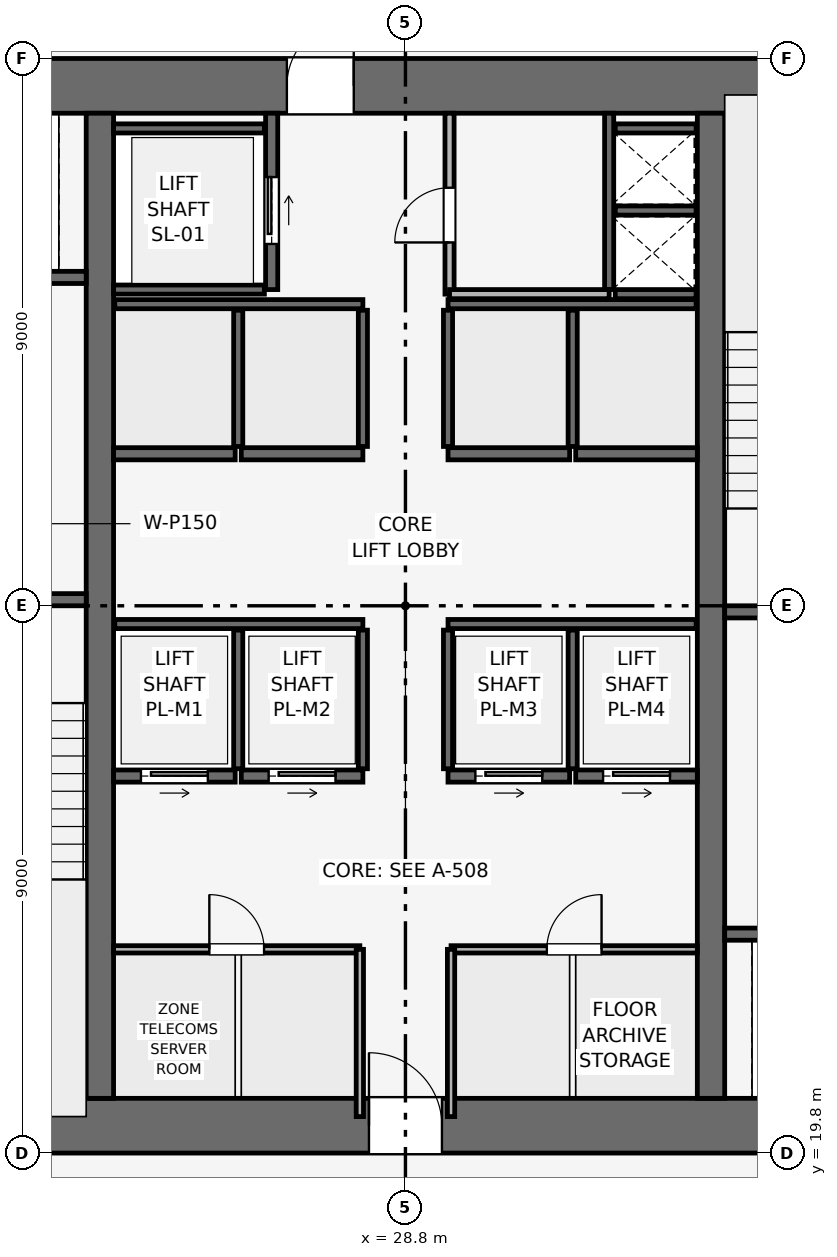
"""IFC4 building model, lengths in metres.
Left out: names, types, materials, properties, quantities, classifications, styles, units other than length and angle.
Written with IfcOpenShell. Run it as: python <this file> out.ifc"""

import sys

from ifc_helpers import new_model, si_unit, direction, frame, frame_2d, origin, place, context, subcontext, project, spatial, rectangle, extrude, element, fill, save


model = new_model("IFC4")
c1 = context("Model", 3, precision=1e-05, world=origin(), true_north=direction((0.0, 1.0)))
c2 = subcontext(c1, "Body", "Model", "MODEL_VIEW")
j1 = project(units=[si_unit("LENGTHUNIT", "METRE"), si_unit("PLANEANGLEUNIT", "RADIAN")], contexts=[c1])
p1 = place(None, origin())
s1 = spatial("IfcSite", under=j1, at=p1, CompositionType="ELEMENT")
p2 = place(p1, origin())
s2 = spatial("IfcBuilding", under=s1, at=p2, CompositionType="ELEMENT")
p3 = place(p2, frame((0.0, 0.0, 168.3)))
s3 = spatial("IfcBuildingStorey", under=s2, at=p3, CompositionType="ELEMENT", Elevation=168.3)
p4 = place(p3, frame((19.8, 20.25, 0.0), z_axis=(0.0, 0.0, 1.0), x_axis=(1.0, 0.0, 0.0)))
e1 = element("IfcWall", 1, at=p4, inside=s3, PredefinedType="SHEAR", context=c2, shape_type="SweptSolid", body=[
    extrude(rectangle(XDim=18.0, YDim=0.9, at=frame_2d((9.0, 0.0))), origin(), (0.0, 0.0, 1.0), 3.75),
])
p5 = place(p4, frame((8.4, 0.0, 0.0)))
e2 = element("IfcOpeningElement", 2, at=p5, cuts=e1, PredefinedType="OPENING", context=c2, shape_type="SweptSolid", body=[
    extrude(rectangle(XDim=1.2, YDim=2.2, at=frame_2d((0.6, 1.1))), frame((0.0, 0.46, 0.0), z_axis=(0.0, -1.0, 0.0), x_axis=(1.0, 0.0, 0.0)), (0.0, 0.0, 1.0), 0.92),
])
p6 = place(p3, frame((19.8, 37.35, 0.0), z_axis=(0.0, 0.0, 1.0), x_axis=(1.0, 0.0, 0.0)))
e3 = element("IfcWall", 3, at=p6, inside=s3, PredefinedType="SHEAR", context=c2, shape_type="SweptSolid", body=[
    extrude(rectangle(XDim=18.0, YDim=0.9, at=frame_2d((9.0, 0.0))), origin(), (0.0, 0.0, 1.0), 3.75),
])
p7 = place(p6, frame((7.05, 0.0, 0.0)))
e4 = element("IfcOpeningElement", 4, at=p7, cuts=e3, PredefinedType="OPENING", context=c2, shape_type="SweptSolid", body=[
    extrude(rectangle(XDim=1.1, YDim=2.15, at=frame_2d((0.55, 1.075))), frame((0.0, 0.46, 0.0), z_axis=(0.0, -1.0, 0.0), x_axis=(1.0, 0.0, 0.0)), (0.0, 0.0, 1.0), 0.92),
])
for number, where, z_axis, x_axis in (
    (5, (23.775, 20.7, 0.0), (0.0, 0.0, 1.0), (0.0, 1.0, 0.0)),
    (6, (33.825, 20.7, 0.0), (0.0, 0.0, 1.0), (0.0, 1.0, 0.0)),
):
    element("IfcWall", number, at=place(p3, frame(where, z_axis=z_axis, x_axis=x_axis)), inside=s3, PredefinedType="SHEAR", context=c2, shape_type="SweptSolid", body=[
        extrude(rectangle(XDim=16.2, YDim=0.45, at=frame_2d((8.1, 0.0))), origin(), (0.0, 0.0, 1.0), 3.75),
    ])
p8 = place(p3, frame((20.4, 28.9, 0.0), z_axis=(0.0, 0.0, 1.0), x_axis=(1.0, 0.0, 0.0)))
e7 = element("IfcWall", 7, at=p8, inside=s3, PredefinedType="SHEAR", context=c2, shape_type="SweptSolid", body=[
    extrude(rectangle(XDim=3.15, YDim=0.2, at=frame_2d((1.575, 0.0))), origin(), (0.0, 0.0, 1.0), 3.495),
])
p9 = place(p8, frame((0.8, 0.0, 0.0)))
e8 = element("IfcOpeningElement", 8, at=p9, cuts=e7, PredefinedType="OPENING", context=c2, shape_type="SweptSolid", body=[
    extrude(rectangle(XDim=1.0, YDim=2.1, at=frame_2d((0.5, 1.05))), frame((0.0, 0.11, 0.0), z_axis=(0.0, -1.0, 0.0), x_axis=(1.0, 0.0, 0.0)), (0.0, 0.0, 1.0), 0.22),
])
p10 = place(p3, frame((34.05, 28.7, 0.0), z_axis=(0.0, 0.0, 1.0), x_axis=(1.0, 0.0, 0.0)))
e9 = element("IfcWall", 9, at=p10, inside=s3, PredefinedType="SHEAR", context=c2, shape_type="SweptSolid", body=[
    extrude(rectangle(XDim=3.15, YDim=0.2, at=frame_2d((1.575, 0.0))), origin(), (0.0, 0.0, 1.0), 3.495),
])
p11 = place(p10, frame((0.8, 0.0, 0.0)))
e10 = element("IfcOpeningElement", 10, at=p11, cuts=e9, PredefinedType="OPENING", context=c2, shape_type="SweptSolid", body=[
    extrude(rectangle(XDim=1.0, YDim=2.1, at=frame_2d((0.5, 1.05))), frame((0.0, 0.11, 0.0), z_axis=(0.0, -1.0, 0.0), x_axis=(1.0, 0.0, 0.0)), (0.0, 0.0, 1.0), 0.22),
])
p12 = place(p3, frame((32.15, 34.0, 0.0), z_axis=(0.0, 0.0, 1.0), x_axis=(0.0, 1.0, 0.0)))
e11 = element("IfcWall", 11, at=p12, inside=s3, PredefinedType="SHEAR", context=c2, shape_type="SweptSolid", body=[
    extrude(rectangle(XDim=2.9, YDim=0.15, at=frame_2d((1.45, 0.0))), origin(), (0.0, 0.0, 1.0), 3.495),
])
for number, where, z_axis, x_axis in (
    (12, (32.25, 33.925, 0.0), (0.0, 0.0, 1.0), (1.0, 0.0, 0.0)),
    (13, (32.25, 35.3, 0.0), (0.0, 0.0, 1.0), (1.0, 0.0, 0.0)),
):
    element("IfcWall", number, at=place(p3, frame(where, z_axis=z_axis, x_axis=x_axis)), inside=s3, PredefinedType="SHEAR", context=c2, shape_type="SweptSolid", body=[
        extrude(rectangle(XDim=1.33, YDim=0.15, at=frame_2d((0.665, 0.0))), origin(), (0.0, 0.0, 1.0), 3.495),
    ])
p13 = place(p3, frame((20.5, 34.2, 0.0), z_axis=(0.0, 0.0, 1.0), x_axis=(1.0, 0.0, 0.0)))
e14 = element("IfcWall", 14, at=p13, inside=s3, PredefinedType="SHEAR", context=c2, shape_type="SweptSolid", body=[
    extrude(rectangle(XDim=3.05, YDim=0.2, at=frame_2d((1.525, 0.0))), origin(), (0.0, 0.0, 1.0), 3.495),
])
p14 = place(p13, frame((0.75, 0.0, 0.0)))
e15 = element("IfcOpeningElement", 15, at=p14, cuts=e14, PredefinedType="OPENING", context=c2, shape_type="SweptSolid", body=[
    extrude(rectangle(XDim=1.1, YDim=2.15, at=frame_2d((0.55, 1.075))), frame((0.0, 0.11, 0.0), z_axis=(0.0, -1.0, 0.0), x_axis=(1.0, 0.0, 0.0)), (0.0, 0.0, 1.0), 0.22),
])
p15 = place(p3, frame((34.05, 23.4, 0.0), z_axis=(0.0, 0.0, 1.0), x_axis=(1.0, 0.0, 0.0)))
e16 = element("IfcWall", 16, at=p15, inside=s3, PredefinedType="SHEAR", context=c2, shape_type="SweptSolid", body=[
    extrude(rectangle(XDim=3.05, YDim=0.2, at=frame_2d((1.525, 0.0))), origin(), (0.0, 0.0, 1.0), 3.495),
])
p16 = place(p15, frame((1.2, 0.0, 0.0)))
e17 = element("IfcOpeningElement", 17, at=p16, cuts=e16, PredefinedType="OPENING", context=c2, shape_type="SweptSolid", body=[
    extrude(rectangle(XDim=1.1, YDim=2.15, at=frame_2d((0.55, 1.075))), frame((0.0, 0.11, 0.0), z_axis=(0.0, -1.0, 0.0), x_axis=(1.0, 0.0, 0.0)), (0.0, 0.0, 1.0), 0.22),
])
p17 = place(p3, frame((26.6, 34.0, 0.0), z_axis=(0.0, 0.0, 1.0), x_axis=(0.0, 1.0, 0.0)))
e18 = element("IfcWall", 18, at=p17, inside=s3, PredefinedType="SHEAR", context=c2, shape_type="SweptSolid", body=[
    extrude(rectangle(XDim=2.9, YDim=0.2, at=frame_2d((1.45, 0.0))), origin(), (0.0, 0.0, 1.0), 3.495),
])
p18 = place(p17, frame((0.75, 0.0, 0.0)))
e19 = element("IfcOpeningElement", 19, at=p18, cuts=e18, PredefinedType="OPENING", context=c2, shape_type="SweptSolid", body=[
    extrude(rectangle(XDim=1.1, YDim=2.15, at=frame_2d((0.55, 1.075))), frame((0.0, 0.11, 0.0), z_axis=(0.0, -1.0, 0.0), x_axis=(1.0, 0.0, 0.0)), (0.0, 0.0, 1.0), 0.22),
])
for number, where, z_axis, x_axis in (
    (20, (24.0, 34.0, 0.0), (0.0, 0.0, 1.0), (1.0, 0.0, 0.0)),
    (21, (24.0, 36.65, 0.0), (0.0, 0.0, 1.0), (1.0, 0.0, 0.0)),
):
    element("IfcWall", number, at=place(p3, frame(where, z_axis=z_axis, x_axis=x_axis)), inside=s3, PredefinedType="SHEAR", context=c2, shape_type="SweptSolid", body=[
        extrude(rectangle(XDim=2.48, YDim=0.15, at=frame_2d((1.24, 0.0))), origin(), (0.0, 0.0, 1.0), 3.495),
    ])
p19 = place(p3, frame((24.0, 26.0, 0.0), z_axis=(0.0, 0.0, 1.0), x_axis=(1.0, 0.0, 0.0)))
e22 = element("IfcWall", 22, at=p19, inside=s3, PredefinedType="SHEAR", context=c2, shape_type="SweptSolid", body=[
    extrude(rectangle(XDim=2.0, YDim=0.2, at=frame_2d((1.0, 0.0))), origin(), (0.0, 0.0, 1.0), 3.495),
])
p20 = place(p19, frame((0.45, 0.0, 0.0)))
e23 = element("IfcOpeningElement", 23, at=p20, cuts=e22, PredefinedType="OPENING", context=c2, shape_type="SweptSolid", body=[
    extrude(rectangle(XDim=1.1, YDim=2.15, at=frame_2d((0.55, 1.075))), frame((0.0, 0.11, 0.0), z_axis=(0.0, -1.0, 0.0), x_axis=(1.0, 0.0, 0.0)), (0.0, 0.0, 1.0), 0.22),
])
p21 = place(p3, frame((26.1, 26.0, 0.0), z_axis=(0.0, 0.0, 1.0), x_axis=(1.0, 0.0, 0.0)))
e24 = element("IfcWall", 24, at=p21, inside=s3, PredefinedType="SHEAR", context=c2, shape_type="SweptSolid", body=[
    extrude(rectangle(XDim=2.0, YDim=0.2, at=frame_2d((1.0, 0.0))), origin(), (0.0, 0.0, 1.0), 3.495),
])
p22 = place(p21, frame((0.45, 0.0, 0.0)))
e25 = element("IfcOpeningElement", 25, at=p22, cuts=e24, PredefinedType="OPENING", context=c2, shape_type="SweptSolid", body=[
    extrude(rectangle(XDim=1.1, YDim=2.15, at=frame_2d((0.55, 1.075))), frame((0.0, 0.11, 0.0), z_axis=(0.0, -1.0, 0.0), x_axis=(1.0, 0.0, 0.0)), (0.0, 0.0, 1.0), 0.22),
])
p23 = place(p3, frame((29.5, 26.0, 0.0), z_axis=(0.0, 0.0, 1.0), x_axis=(1.0, 0.0, 0.0)))
e26 = element("IfcWall", 26, at=p23, inside=s3, PredefinedType="SHEAR", context=c2, shape_type="SweptSolid", body=[
    extrude(rectangle(XDim=2.0, YDim=0.2, at=frame_2d((1.0, 0.0))), origin(), (0.0, 0.0, 1.0), 3.495),
])
p24 = place(p23, frame((0.45, 0.0, 0.0)))
e27 = element("IfcOpeningElement", 27, at=p24, cuts=e26, PredefinedType="OPENING", context=c2, shape_type="SweptSolid", body=[
    extrude(rectangle(XDim=1.1, YDim=2.15, at=frame_2d((0.55, 1.075))), frame((0.0, 0.11, 0.0), z_axis=(0.0, -1.0, 0.0), x_axis=(1.0, 0.0, 0.0)), (0.0, 0.0, 1.0), 0.22),
])
p25 = place(p3, frame((31.6, 26.0, 0.0), z_axis=(0.0, 0.0, 1.0), x_axis=(1.0, 0.0, 0.0)))
e28 = element("IfcWall", 28, at=p25, inside=s3, PredefinedType="SHEAR", context=c2, shape_type="SweptSolid", body=[
    extrude(rectangle(XDim=2.0, YDim=0.2, at=frame_2d((1.0, 0.0))), origin(), (0.0, 0.0, 1.0), 3.495),
])
p26 = place(p25, frame((0.45, 0.0, 0.0)))
e29 = element("IfcOpeningElement", 29, at=p26, cuts=e28, PredefinedType="OPENING", context=c2, shape_type="SweptSolid", body=[
    extrude(rectangle(XDim=1.1, YDim=2.15, at=frame_2d((0.55, 1.075))), frame((0.0, 0.11, 0.0), z_axis=(0.0, -1.0, 0.0), x_axis=(1.0, 0.0, 0.0)), (0.0, 0.0, 1.0), 0.22),
])
for number, where, z_axis, x_axis in (
    (30, (24.0, 31.3, 0.0), (0.0, 0.0, 1.0), (1.0, 0.0, 0.0)),
    (31, (26.1, 31.3, 0.0), (0.0, 0.0, 1.0), (1.0, 0.0, 0.0)),
    (32, (29.5, 31.3, 0.0), (0.0, 0.0, 1.0), (1.0, 0.0, 0.0)),
    (33, (31.6, 31.3, 0.0), (0.0, 0.0, 1.0), (1.0, 0.0, 0.0)),
):
    element("IfcWall", number, at=place(p3, frame(where, z_axis=z_axis, x_axis=x_axis)), inside=s3, PredefinedType="SHEAR", context=c2, shape_type="SweptSolid", body=[
        extrude(rectangle(XDim=2.0, YDim=0.2, at=frame_2d((1.0, 0.0))), origin(), (0.0, 0.0, 1.0), 3.495),
    ])
p27 = place(p3, frame((32.25, 36.65, 0.0), z_axis=(0.0, 0.0, 1.0), x_axis=(1.0, 0.0, 0.0)))
e34 = element("IfcWall", 34, at=p27, inside=s3, PredefinedType="SHEAR", context=c2, shape_type="SweptSolid", body=[
    extrude(rectangle(XDim=1.33, YDim=0.15, at=frame_2d((0.665, 0.0))), origin(), (0.0, 0.0, 1.0), 3.495),
])
for number, where, z_axis, x_axis in (
    (35, (24.02, 28.5, 0.0), (0.0, 0.0, 1.0), (1.0, 0.0, 0.0)),
    (36, (29.5, 28.5, 0.0), (0.0, 0.0, 1.0), (1.0, 0.0, 0.0)),
):
    element("IfcWall", number, at=place(p3, frame(where, z_axis=z_axis, x_axis=x_axis)), inside=s3, PredefinedType="SHEAR", context=c2, shape_type="SweptSolid", body=[
        extrude(rectangle(XDim=4.08, YDim=0.15, at=frame_2d((2.04, 0.0))), origin(), (0.0, 0.0, 1.0), 3.495),
    ])
for number, where, z_axis, x_axis in (
    (37, (26.05, 26.12, 0.0), (0.0, 0.0, 1.0), (0.0, 1.0, 0.0)),
    (38, (28.1, 26.12, 0.0), (0.0, 0.0, 1.0), (0.0, 1.0, 0.0)),
    (39, (29.5, 26.12, 0.0), (0.0, 0.0, 1.0), (0.0, 1.0, 0.0)),
    (40, (31.55, 26.12, 0.0), (0.0, 0.0, 1.0), (0.0, 1.0, 0.0)),
):
    element("IfcWall", number, at=place(p3, frame(where, z_axis=z_axis, x_axis=x_axis)), inside=s3, PredefinedType="SHEAR", context=c2, shape_type="SweptSolid", body=[
        extrude(rectangle(XDim=2.28, YDim=0.15, at=frame_2d((1.14, 0.0))), origin(), (0.0, 0.0, 1.0), 3.495),
    ])
for number, where, z_axis, x_axis in (
    (41, (24.02, 33.76, 0.0), (0.0, 0.0, 1.0), (1.0, 0.0, 0.0)),
    (42, (29.5, 33.76, 0.0), (0.0, 0.0, 1.0), (1.0, 0.0, 0.0)),
):
    element("IfcWall", number, at=place(p3, frame(where, z_axis=z_axis, x_axis=x_axis)), inside=s3, PredefinedType="SHEAR", context=c2, shape_type="SweptSolid", body=[
        extrude(rectangle(XDim=4.08, YDim=0.15, at=frame_2d((2.04, 0.0))), origin(), (0.0, 0.0, 1.0), 3.495),
    ])
for number, where, z_axis, x_axis in (
    (43, (26.05, 31.42, 0.0), (0.0, 0.0, 1.0), (0.0, 1.0, 0.0)),
    (44, (28.1, 31.42, 0.0), (0.0, 0.0, 1.0), (0.0, 1.0, 0.0)),
    (45, (29.5, 31.42, 0.0), (0.0, 0.0, 1.0), (0.0, 1.0, 0.0)),
    (46, (31.55, 31.42, 0.0), (0.0, 0.0, 1.0), (0.0, 1.0, 0.0)),
):
    element("IfcWall", number, at=place(p3, frame(where, z_axis=z_axis, x_axis=x_axis)), inside=s3, PredefinedType="SHEAR", context=c2, shape_type="SweptSolid", body=[
        extrude(rectangle(XDim=2.24, YDim=0.15, at=frame_2d((1.12, 0.0))), origin(), (0.0, 0.0, 1.0), 3.495),
    ])
p28 = place(p3, frame((29.525, 33.925, 0.0), z_axis=(0.0, 0.0, 1.0), x_axis=(0.0, 1.0, 0.0)))
e47 = element("IfcWall", 47, at=p28, inside=s3, PredefinedType="PARTITIONING", context=c2, shape_type="SweptSolid", body=[
    extrude(rectangle(XDim=2.975, YDim=0.15, at=frame_2d((1.487, 0.0))), origin(), (0.0, 0.0, 1.0), 3.495),
])
p29 = place(p28, frame((0.85, 0.0, 0.0)))
e48 = element("IfcOpeningElement", 48, at=p29, cuts=e47, PredefinedType="OPENING", context=c2, shape_type="SweptSolid", body=[
    extrude(rectangle(XDim=0.9, YDim=2.1, at=frame_2d((0.45, 1.05))), frame((0.0, 0.085, 0.0), z_axis=(0.0, -1.0, 0.0), x_axis=(1.0, 0.0, 0.0)), (0.0, 0.0, 1.0), 0.17),
])
p30 = place(p3, frame((29.525, 33.925, 0.0), z_axis=(0.0, 0.0, 1.0), x_axis=(1.0, 0.0, 0.0)))
e49 = element("IfcWall", 49, at=p30, inside=s3, PredefinedType="PARTITIONING", context=c2, shape_type="SweptSolid", body=[
    extrude(rectangle(XDim=2.625, YDim=0.15, at=frame_2d((1.312, 0.0))), origin(), (0.0, 0.0, 1.0), 3.495),
])
p31 = place(p3, frame((24.0, 23.15, 0.0), z_axis=(0.0, 0.0, 1.0), x_axis=(1.0, 0.0, 0.0)))
e50 = element("IfcWall", 50, at=p31, inside=s3, PredefinedType="PARTITIONING", context=c2, shape_type="SweptSolid", body=[
    extrude(rectangle(XDim=4.05, YDim=0.12, at=frame_2d((2.025, 0.0))), origin(), (0.0, 0.0, 1.0), 3.495),
])
p32 = place(p31, frame((1.575, 0.0, 0.0)))
e51 = element("IfcOpeningElement", 51, at=p32, cuts=e50, PredefinedType="OPENING", context=c2, shape_type="SweptSolid", body=[
    extrude(rectangle(XDim=0.9, YDim=2.1, at=frame_2d((0.45, 1.05))), frame((0.0, 0.07, 0.0), z_axis=(0.0, -1.0, 0.0), x_axis=(1.0, 0.0, 0.0)), (0.0, 0.0, 1.0), 0.14),
])
p33 = place(p3, frame((28.05, 20.4, 0.0), z_axis=(0.0, 0.0, 1.0), x_axis=(0.0, 1.0, 0.0)))
e52 = element("IfcWall", 52, at=p33, inside=s3, PredefinedType="PARTITIONING", context=c2, shape_type="SweptSolid", body=[
    extrude(rectangle(XDim=2.75, YDim=0.12, at=frame_2d((1.375, 0.0))), origin(), (0.0, 0.0, 1.0), 3.495),
])
p34 = place(p3, frame((29.55, 23.15, 0.0), z_axis=(0.0, 0.0, 1.0), x_axis=(1.0, 0.0, 0.0)))
e53 = element("IfcWall", 53, at=p34, inside=s3, PredefinedType="PARTITIONING", context=c2, shape_type="SweptSolid", body=[
    extrude(rectangle(XDim=4.05, YDim=0.12, at=frame_2d((2.025, 0.0))), origin(), (0.0, 0.0, 1.0), 3.495),
])
p35 = place(p34, frame((1.575, 0.0, 0.0)))
e54 = element("IfcOpeningElement", 54, at=p35, cuts=e53, PredefinedType="OPENING", context=c2, shape_type="SweptSolid", body=[
    extrude(rectangle(XDim=0.9, YDim=2.1, at=frame_2d((0.45, 1.05))), frame((0.0, 0.07, 0.0), z_axis=(0.0, -1.0, 0.0), x_axis=(1.0, 0.0, 0.0)), (0.0, 0.0, 1.0), 0.14),
])
p36 = place(p3, frame((29.55, 20.4, 0.0), z_axis=(0.0, 0.0, 1.0), x_axis=(0.0, 1.0, 0.0)))
e55 = element("IfcWall", 55, at=p36, inside=s3, PredefinedType="PARTITIONING", context=c2, shape_type="SweptSolid", body=[
    extrude(rectangle(XDim=2.75, YDim=0.12, at=frame_2d((1.375, 0.0))), origin(), (0.0, 0.0, 1.0), 3.495),
])
p37 = place(p18, origin())
e56 = element("IfcDoor", 56, at=p37, inside=s3, OperationType="SLIDING_TO_RIGHT", PredefinedType="DOOR", context=c2, shape_type="SweptSolid", body=[
    extrude(rectangle(XDim=1.1, YDim=2.15, at=frame_2d((0.55, 1.075))), frame((0.0, 0.025, 0.0), z_axis=(0.0, -1.0, 0.0), x_axis=(1.0, 0.0, 0.0)), (0.0, 0.0, 1.0), 0.05),
])
fill(e19, e56)
p38 = place(p20, origin())
e57 = element("IfcDoor", 57, at=p38, inside=s3, OperationType="SLIDING_TO_RIGHT", PredefinedType="DOOR", context=c2, shape_type="SweptSolid", body=[
    extrude(rectangle(XDim=1.1, YDim=2.15, at=frame_2d((0.55, 1.075))), frame((0.0, 0.025, 0.0), z_axis=(0.0, -1.0, 0.0), x_axis=(1.0, 0.0, 0.0)), (0.0, 0.0, 1.0), 0.05),
])
fill(e23, e57)
p39 = place(p22, origin())
e58 = element("IfcDoor", 58, at=p39, inside=s3, OperationType="SLIDING_TO_RIGHT", PredefinedType="DOOR", context=c2, shape_type="SweptSolid", body=[
    extrude(rectangle(XDim=1.1, YDim=2.15, at=frame_2d((0.55, 1.075))), frame((0.0, 0.025, 0.0), z_axis=(0.0, -1.0, 0.0), x_axis=(1.0, 0.0, 0.0)), (0.0, 0.0, 1.0), 0.05),
])
fill(e25, e58)
p40 = place(p24, origin())
e59 = element("IfcDoor", 59, at=p40, inside=s3, OperationType="SLIDING_TO_RIGHT", PredefinedType="DOOR", context=c2, shape_type="SweptSolid", body=[
    extrude(rectangle(XDim=1.1, YDim=2.15, at=frame_2d((0.55, 1.075))), frame((0.0, 0.025, 0.0), z_axis=(0.0, -1.0, 0.0), x_axis=(1.0, 0.0, 0.0)), (0.0, 0.0, 1.0), 0.05),
])
fill(e27, e59)
p41 = place(p26, origin())
e60 = element("IfcDoor", 60, at=p41, inside=s3, OperationType="SLIDING_TO_RIGHT", PredefinedType="DOOR", context=c2, shape_type="SweptSolid", body=[
    extrude(rectangle(XDim=1.1, YDim=2.15, at=frame_2d((0.55, 1.075))), frame((0.0, 0.025, 0.0), z_axis=(0.0, -1.0, 0.0), x_axis=(1.0, 0.0, 0.0)), (0.0, 0.0, 1.0), 0.05),
])
fill(e29, e60)
p42 = place(p29, origin())
e61 = element("IfcDoor", 61, at=p42, inside=s3, OperationType="SINGLE_SWING_LEFT", PredefinedType="DOOR", context=c2, shape_type="SweptSolid", body=[
    extrude(rectangle(XDim=0.9, YDim=2.1, at=frame_2d((0.45, 1.05))), frame((0.0, 0.025, 0.0), z_axis=(0.0, -1.0, 0.0), x_axis=(1.0, 0.0, 0.0)), (0.0, 0.0, 1.0), 0.05),
])
fill(e48, e61)
p43 = place(p32, origin())
e62 = element("IfcDoor", 62, at=p43, inside=s3, OperationType="SINGLE_SWING_LEFT", PredefinedType="DOOR", context=c2, shape_type="SweptSolid", body=[
    extrude(rectangle(XDim=0.9, YDim=2.1, at=frame_2d((0.45, 1.05))), frame((0.0, 0.025, 0.0), z_axis=(0.0, -1.0, 0.0), x_axis=(1.0, 0.0, 0.0)), (0.0, 0.0, 1.0), 0.05),
])
fill(e51, e62)
p44 = place(p35, origin())
e63 = element("IfcDoor", 63, at=p44, inside=s3, OperationType="SINGLE_SWING_RIGHT", PredefinedType="DOOR", context=c2, shape_type="SweptSolid", body=[
    extrude(rectangle(XDim=0.9, YDim=2.1, at=frame_2d((0.45, 1.05))), frame((0.0, 0.025, 0.0), z_axis=(0.0, -1.0, 0.0), x_axis=(1.0, 0.0, 0.0)), (0.0, 0.0, 1.0), 0.05),
])
fill(e54, e63)
p45 = place(p5, origin())
e64 = element("IfcDoor", 64, at=p45, inside=s3, OperationType="SINGLE_SWING_LEFT", PredefinedType="DOOR", context=c2, shape_type="SweptSolid", body=[
    extrude(rectangle(XDim=1.2, YDim=2.2, at=frame_2d((0.6, 1.1))), frame((0.0, 0.025, 0.0), z_axis=(0.0, -1.0, 0.0), x_axis=(1.0, 0.0, 0.0)), (0.0, 0.0, 1.0), 0.05),
])
fill(e2, e64)
p46 = place(p7, origin())
e65 = element("IfcDoor", 65, at=p46, inside=s3, OperationType="SINGLE_SWING_RIGHT", PredefinedType="DOOR", context=c2, shape_type="SweptSolid", body=[
    extrude(rectangle(XDim=1.1, YDim=2.15, at=frame_2d((0.55, 1.075))), frame((0.0, 0.025, 0.0), z_axis=(0.0, -1.0, 0.0), x_axis=(1.0, 0.0, 0.0)), (0.0, 0.0, 1.0), 0.05),
])
fill(e4, e65)
save(model, sys.argv[1])
